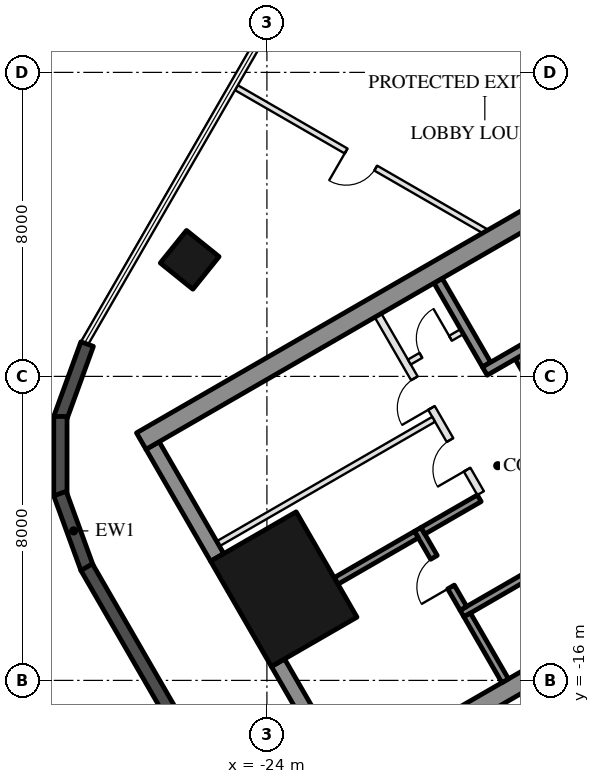
"""IFC4 building model, lengths in metres.
Left out: names, types, materials, properties, quantities, classifications, styles, units other than length and angle.
Written with IfcOpenShell. Run it as: python <this file> out.ifc"""

import sys

from ifc_helpers import new_model, si_unit, direction, frame, frame_2d, origin, origin_2d, place, context, subcontext, project, spatial, rectangle, hollow_rectangle, extrude, boolean, halfspace, element, fill, save


model = new_model("IFC4")
c1 = context("Model", 3, precision=1e-05, world=origin(), true_north=direction((0.0, 1.0)))
c2 = subcontext(c1, "Body", "Model", "MODEL_VIEW")
j1 = project(units=[si_unit("LENGTHUNIT", "METRE"), si_unit("PLANEANGLEUNIT", "RADIAN")], contexts=[c1])
p1 = place(None, origin())
s1 = spatial("IfcSite", under=j1, at=p1, CompositionType="ELEMENT")
p2 = place(p1, origin())
s2 = spatial("IfcBuilding", under=s1, at=p2, CompositionType="ELEMENT")
p3 = place(p2, frame((0.0, 0.0, 9.0)))
s3 = spatial("IfcBuildingStorey", under=s2, at=p3, CompositionType="ELEMENT", Elevation=9.0)
p4 = place(p3, frame((-26.032, -4.932, 0.0), z_axis=(0.144210024077, 0.022406246977, 0.989293398872), x_axis=(-0.493357756794, -0.864999630049, 0.091508271899)))
e1 = element("IfcColumn", 1, at=p4, inside=s3, PredefinedType="COLUMN", context=c2, shape_type="SweptSolid", body=[
    boolean("DIFFERENCE", boolean("DIFFERENCE", extrude(hollow_rectangle(XDim=1.1, YDim=1.1, WallThickness=0.05, at=origin_2d()), origin(), (0.0, 0.0, 1.0), 6.57), halfspace(frame((0.0, 0.0, 0.019), z_axis=(0.0, 0.0, 1.0), x_axis=(1.0, 0.0, 0.0)), True)), halfspace(frame((0.0, 0.0, 6.552), z_axis=(0.0, 0.0, 1.0), x_axis=(1.0, 0.0, 0.0)), False)),
])
p5 = place(p3, frame((-23.556, -13.6, 0.0), z_axis=(0.0, 0.0, 1.0), x_axis=(-0.5, 0.866025403784, 0.0)))
e2 = element("IfcColumn", 2, at=p5, inside=s3, PredefinedType="COLUMN", context=c2, shape_type="SweptSolid", body=[
    extrude(hollow_rectangle(XDim=3.2, YDim=2.6, WallThickness=0.08, at=origin_2d()), origin(), (0.0, 0.0, 1.0), 6.5),
])
p6 = place(p3, frame((-28.73, -7.15, 0.0), z_axis=(0.0, 0.0, 1.0), x_axis=(-0.342005648315, -0.939697896412, 0.0)))
e3 = element("IfcWall", 3, at=p6, inside=s3, PredefinedType="SOLIDWALL", context=c2, shape_type="SweptSolid", body=[
    extrude(rectangle(XDim=2.09, YDim=0.35, at=frame_2d((1.045, 0.0))), origin(), (0.0, 0.0, 1.0), 6.15),
])
for number, where, z_axis, x_axis in (
    (4, (-29.434, -9.054, 0.0), (0.0, 0.0, 1.0), (0.0, -1.0, 0.0)),
    (5, (-29.445, -11.084, 0.0), (0.0, 0.0, 1.0), (0.342, -0.94, 0.0)),
):
    element("IfcWall", number, at=place(p3, frame(where, z_axis=z_axis, x_axis=x_axis)), inside=s3, PredefinedType="SOLIDWALL", context=c2, shape_type="SweptSolid", body=[
        extrude(rectangle(XDim=2.09, YDim=0.35, at=frame_2d((1.045, 0.0))), origin(), (0.0, 0.0, 1.0), 6.15),
    ])
p7 = place(p3, frame((-28.743, -13.021, 0.0), z_axis=(0.0, 0.0, 1.0), x_axis=(0.499981900942, -0.866035853028, 0.0)))
e6 = element("IfcWall", 6, at=p7, inside=s3, PredefinedType="SOLIDWALL", context=c2, shape_type="SweptSolid", body=[
    extrude(rectangle(XDim=6.191, YDim=0.35, at=frame_2d((3.095, 0.0))), origin(), (0.0, 0.0, 1.0), 6.15),
])
p8 = place(p3, frame((-8.547, -10.997, 0.0), z_axis=(0.0, 0.0, 1.0), x_axis=(-0.866024264262, -0.500001973705, 0.0)))
e7 = element("IfcWall", 7, at=p8, inside=s3, PredefinedType="SHEAR", context=c2, shape_type="SweptSolid", body=[
    extrude(rectangle(XDim=15.6, YDim=0.5, at=frame_2d((7.8, 0.0))), origin(), (0.0, 0.0, 1.0), 6.15),
])
p9 = place(p3, frame((-23.708, -15.536, 0.0), z_axis=(0.0, 0.0, 1.0), x_axis=(0.500008388397, -0.866020560687, 0.0)))
e8 = element("IfcWall", 8, at=p9, inside=s3, PredefinedType="SHEAR", context=c2, shape_type="SweptSolid", body=[
    extrude(rectangle(XDim=3.4, YDim=0.4, at=frame_2d((1.7, 0.0))), origin(), (0.0, 0.0, 1.0), 6.15),
])
p10 = place(p3, frame((-27.009, -9.82, 0.0), z_axis=(0.0, 0.0, 1.0), x_axis=(0.499977295307, -0.866038511948, 0.0)))
e9 = element("IfcWall", 9, at=p10, inside=s3, PredefinedType="SHEAR", context=c2, shape_type="SweptSolid", body=[
    extrude(rectangle(XDim=3.4, YDim=0.4, at=frame_2d((1.7, 0.0))), origin(), (0.0, 0.0, 1.0), 6.15),
])
p11 = place(p3, frame((-19.496, -5.482, 0.0), z_axis=(0.0, 0.0, 1.0), x_axis=(0.499990435942, -0.866030925526, 0.0)))
e10 = element("IfcWall", 10, at=p11, inside=s3, PredefinedType="SHEAR", context=c2, shape_type="SweptSolid", body=[
    extrude(rectangle(XDim=2.55, YDim=0.25, at=frame_2d((1.275, 0.0))), origin(), (0.0, 0.0, 1.0), 6.15),
])
p12 = place(p3, frame((-17.381, -7.495, 0.0), z_axis=(0.0, 0.0, 1.0), x_axis=(0.500011755427, -0.866018616679, 0.0)))
e11 = element("IfcWall", 11, at=p12, inside=s3, PredefinedType="SHEAR", context=c2, shape_type="SweptSolid", body=[
    extrude(rectangle(XDim=2.8, YDim=0.2, at=frame_2d((1.4, 0.0))), origin(), (0.0, 0.0, 1.0), 6.15),
])
p13 = place(p3, frame((-10.068, -9.162, 0.0), z_axis=(0.0, 0.0, 1.0), x_axis=(-0.866032725843, -0.499987317609, 0.0)))
e12 = element("IfcWall", 12, at=p13, inside=s3, PredefinedType="SHEAR", context=c2, shape_type="SweptSolid", body=[
    extrude(rectangle(XDim=10.16, YDim=0.2, at=frame_2d((5.08, 0.0))), origin(), (0.0, 0.0, 1.0), 6.15),
])
p14 = place(p13, frame((0.72, 0.0, 0.0)))
e13 = element("IfcOpeningElement", 13, at=p14, cuts=e12, PredefinedType="OPENING", context=c2, shape_type="SweptSolid", body=[
    extrude(rectangle(XDim=0.9, YDim=2.1, at=frame_2d((0.45, 1.05))), frame((0.0, 0.11, 0.0), z_axis=(0.0, -1.0, 0.0), x_axis=(1.0, 0.0, 0.0)), (0.0, 0.0, 1.0), 0.22),
])
p15 = place(p13, frame((5.8, 0.0, 0.0)))
e14 = element("IfcOpeningElement", 14, at=p15, cuts=e12, PredefinedType="OPENING", context=c2, shape_type="SweptSolid", body=[
    extrude(rectangle(XDim=0.9, YDim=2.1, at=frame_2d((0.45, 1.05))), frame((0.0, 0.11, 0.0), z_axis=(0.0, -1.0, 0.0), x_axis=(1.0, 0.0, 0.0)), (0.0, 0.0, 1.0), 0.22),
])
p16 = place(p3, frame((-20.031, -12.026, 0.0), z_axis=(0.0, 0.0, 1.0), x_axis=(0.500033551112, -0.866006032174, 0.0)))
e15 = element("IfcWall", 15, at=p16, inside=s3, PredefinedType="SHEAR", context=c2, shape_type="SweptSolid", body=[
    extrude(rectangle(XDim=2.4, YDim=0.2, at=frame_2d((1.2, 0.0))), origin(), (0.0, 0.0, 1.0), 6.15),
])
p17 = place(p16, frame((0.85, 0.0, 0.0)))
e16 = element("IfcOpeningElement", 16, at=p17, cuts=e15, PredefinedType="OPENING", context=c2, shape_type="SweptSolid", body=[
    extrude(rectangle(XDim=0.9, YDim=2.1, at=frame_2d((0.45, 1.05))), frame((0.0, 0.11, 0.0), z_axis=(0.0, -1.0, 0.0), x_axis=(1.0, 0.0, 0.0)), (0.0, 0.0, 1.0), 0.22),
])
p18 = place(p3, frame((-18.413, -11.208, 0.0), z_axis=(0.0, 0.0, 1.0), x_axis=(-0.866038183914, -0.499977863513, 0.0)))
e17 = element("IfcWall", 17, at=p18, inside=s3, PredefinedType="SHEAR", context=c2, shape_type="SweptSolid", body=[
    extrude(rectangle(XDim=1.71, YDim=0.2, at=frame_2d((0.855, 0.0))), origin(), (0.0, 0.0, 1.0), 6.15),
])
p19 = place(p3, frame((-18.73, -14.278, 0.0), z_axis=(0.0, 0.0, 1.0), x_axis=(0.50002537861, -0.866010750942, 0.0)))
e18 = element("IfcWall", 18, at=p19, inside=s3, PredefinedType="SHEAR", context=c2, shape_type="SweptSolid", body=[
    extrude(rectangle(XDim=2.0, YDim=0.2, at=frame_2d((1.0, 0.0))), origin(), (0.0, 0.0, 1.0), 6.15),
])
p20 = place(p3, frame((-20.067, -12.163, 0.0), z_axis=(0.0, 0.0, 1.0), x_axis=(-0.866048967903, -0.499959183527, 0.0)))
e19 = element("IfcWall", 19, at=p20, inside=s3, PredefinedType="SHEAR", context=c2, shape_type="SweptSolid", body=[
    extrude(rectangle(XDim=2.44, YDim=0.2, at=frame_2d((1.22, 0.0))), origin(), (0.0, 0.0, 1.0), 6.15),
])
p21 = place(p3, frame((-21.076, -6.395, 0.0), z_axis=(0.0, 0.0, 1.0), x_axis=(0.50001468107, -0.866016927499, 0.0)))
e20 = element("IfcWall", 20, at=p21, inside=s3, PredefinedType="PARTITIONING", context=c2, shape_type="SweptSolid", body=[
    extrude(rectangle(XDim=5.4, YDim=0.2, at=frame_2d((2.7, 0.0))), origin(), (0.0, 0.0, 1.0), 6.15),
])
p22 = place(p21, frame((1.913, 0.0, 0.0)))
e21 = element("IfcOpeningElement", 21, at=p22, cuts=e20, PredefinedType="OPENING", context=c2, shape_type="SweptSolid", body=[
    extrude(rectangle(XDim=0.9, YDim=2.1, at=frame_2d((0.45, 1.05))), frame((0.0, 0.11, 0.0), z_axis=(0.0, -1.0, 0.0), x_axis=(1.0, 0.0, 0.0)), (0.0, 0.0, 1.0), 0.22),
])
p23 = place(p21, frame((3.788, 0.0, 0.0)))
e22 = element("IfcOpeningElement", 22, at=p23, cuts=e20, PredefinedType="OPENING", context=c2, shape_type="SweptSolid", body=[
    extrude(rectangle(XDim=0.9, YDim=2.1, at=frame_2d((0.45, 1.05))), frame((0.0, 0.11, 0.0), z_axis=(0.0, -1.0, 0.0), x_axis=(1.0, 0.0, 0.0)), (0.0, 0.0, 1.0), 0.22),
])
p24 = place(p3, frame((-18.866, -6.822, 0.0), z_axis=(0.0, 0.0, 1.0), x_axis=(-0.866028054938, -0.499995408039, 0.0)))
e23 = element("IfcWall", 23, at=p24, inside=s3, PredefinedType="PARTITIONING", context=c2, shape_type="SweptSolid", body=[
    extrude(rectangle(XDim=1.6, YDim=0.15, at=frame_2d((0.8, 0.0))), origin(), (0.0, 0.0, 1.0), 6.15),
])
p25 = place(p24, frame((0.35, 0.0, 0.0)))
e24 = element("IfcOpeningElement", 24, at=p25, cuts=e23, PredefinedType="OPENING", context=c2, shape_type="SweptSolid", body=[
    extrude(rectangle(XDim=0.9, YDim=2.1, at=frame_2d((0.45, 1.05))), frame((0.0, 0.085, 0.0), z_axis=(0.0, -1.0, 0.0), x_axis=(1.0, 0.0, 0.0)), (0.0, 0.0, 1.0), 0.17),
])
p26 = place(p3, frame((-19.613, -9.13, 0.0), z_axis=(0.0, 0.0, 1.0), x_axis=(-0.866037242061, -0.499979494943, 0.0)))
e25 = element("IfcWall", 25, at=p26, inside=s3, PredefinedType="PARTITIONING", context=c2, shape_type="SweptSolid", body=[
    extrude(rectangle(XDim=6.55, YDim=0.15, at=frame_2d((3.275, 0.0))), origin(), (0.0, 0.0, 1.0), 6.15),
])
p27 = place(p3, frame((-15.274, -2.756, 0.0), z_axis=(0.0, 0.0, 1.0), x_axis=(-0.86602318214, -0.500003847982, 0.0)))
e26 = element("IfcWall", 26, at=p27, inside=s3, PredefinedType="SHEAR", context=c2, shape_type="SweptSolid", body=[
    extrude(rectangle(XDim=13.894, YDim=0.5, at=frame_2d((6.947, 0.0))), origin(), (0.0, 0.0, 1.0), 6.15),
])
p28 = place(p3, frame((-13.812, -5.29, 0.0), z_axis=(0.0, 0.0, 1.0), x_axis=(-0.866023561601, -0.500003190742, 0.0)))
e27 = element("IfcWall", 27, at=p28, inside=s3, PredefinedType="SHEAR", context=c2, shape_type="SweptSolid", body=[
    extrude(rectangle(XDim=5.144, YDim=0.25, at=frame_2d((2.572, 0.0))), origin(), (0.0, 0.0, 1.0), 6.15),
])
p29 = place(p3, frame((-21.628, 5.097, 0.0), z_axis=(0.0, 0.0, 1.0), x_axis=(0.866023652799, -0.500003032783, 0.0)))
e28 = element("IfcWall", 28, at=p29, inside=s3, PredefinedType="SOLIDWALL", context=c2, shape_type="SweptSolid", body=[
    extrude(rectangle(XDim=12.579, YDim=0.2, at=frame_2d((6.289, 0.0))), origin(), (0.0, 0.0, 1.0), 6.15),
])
p30 = place(p3, frame((-24.802, -0.403, 0.0), z_axis=(0.0, 0.0, 1.0), x_axis=(0.866018471794, -0.500012006368, 0.0)))
e29 = element("IfcWall", 29, at=p30, inside=s3, PredefinedType="PARTITIONING", context=c2, shape_type="SweptSolid", body=[
    extrude(rectangle(XDim=7.566, YDim=0.15, at=frame_2d((3.783, 0.0))), origin(), (0.0, 0.0, 1.0), 5.55),
])
p31 = place(p30, frame((3.333, 0.0, 0.0)))
e30 = element("IfcOpeningElement", 30, at=p31, cuts=e29, PredefinedType="OPENING", context=c2, shape_type="SweptSolid", body=[
    extrude(rectangle(XDim=0.9, YDim=2.1, at=frame_2d((0.45, 1.05))), frame((0.0, 0.085, 0.0), z_axis=(0.0, -1.0, 0.0), x_axis=(1.0, 0.0, 0.0)), (0.0, 0.0, 1.0), 0.17),
])
p32 = place(p25, frame((0.9, 0.0, 0.0), z_axis=(0.0, 0.0, 1.0), x_axis=(-1.0, 0.0, 0.0)))
e31 = element("IfcDoor", 31, at=p32, inside=s3, OperationType="SINGLE_SWING_RIGHT", PredefinedType="DOOR", context=c2, shape_type="SweptSolid", body=[
    extrude(rectangle(XDim=0.9, YDim=2.1, at=frame_2d((0.45, 1.05))), frame((0.0, 0.025, 0.0), z_axis=(0.0, -1.0, 0.0), x_axis=(1.0, 0.0, 0.0)), (0.0, 0.0, 1.0), 0.05),
])
fill(e24, e31)
p33 = place(p17, frame((0.9, 0.0, 0.0), z_axis=(0.0, 0.0, 1.0), x_axis=(-1.0, 0.0, 0.0)))
e32 = element("IfcDoor", 32, at=p33, inside=s3, OperationType="SINGLE_SWING_LEFT", PredefinedType="DOOR", context=c2, shape_type="SweptSolid", body=[
    extrude(rectangle(XDim=0.9, YDim=2.1, at=frame_2d((0.45, 1.05))), frame((0.0, 0.025, 0.0), z_axis=(0.0, -1.0, 0.0), x_axis=(1.0, 0.0, 0.0)), (0.0, 0.0, 1.0), 0.05),
])
fill(e16, e32)
p34 = place(p22, frame((0.9, 0.0, 0.0), z_axis=(0.0, 0.0, 1.0), x_axis=(-1.0, 0.0, 0.0)))
e33 = element("IfcDoor", 33, at=p34, inside=s3, OperationType="SINGLE_SWING_LEFT", PredefinedType="DOOR", context=c2, shape_type="SweptSolid", body=[
    extrude(rectangle(XDim=0.9, YDim=2.1, at=frame_2d((0.45, 1.05))), frame((0.0, 0.025, 0.0), z_axis=(0.0, -1.0, 0.0), x_axis=(1.0, 0.0, 0.0)), (0.0, 0.0, 1.0), 0.05),
])
fill(e21, e33)
p35 = place(p23, frame((0.9, 0.0, 0.0), z_axis=(0.0, 0.0, 1.0), x_axis=(-1.0, 0.0, 0.0)))
e34 = element("IfcDoor", 34, at=p35, inside=s3, OperationType="SINGLE_SWING_LEFT", PredefinedType="DOOR", context=c2, shape_type="SweptSolid", body=[
    extrude(rectangle(XDim=0.9, YDim=2.1, at=frame_2d((0.45, 1.05))), frame((0.0, 0.025, 0.0), z_axis=(0.0, -1.0, 0.0), x_axis=(1.0, 0.0, 0.0)), (0.0, 0.0, 1.0), 0.05),
])
fill(e22, e34)
p36 = place(p31, frame((0.9, 0.0, 0.0), z_axis=(0.0, 0.0, 1.0), x_axis=(-1.0, 0.0, 0.0)))
e35 = element("IfcDoor", 35, at=p36, inside=s3, OperationType="SINGLE_SWING_RIGHT", PredefinedType="DOOR", context=c2, shape_type="SweptSolid", body=[
    extrude(rectangle(XDim=0.9, YDim=2.1, at=frame_2d((0.45, 1.05))), frame((0.0, 0.025, 0.0), z_axis=(0.0, -1.0, 0.0), x_axis=(1.0, 0.0, 0.0)), (0.0, 0.0, 1.0), 0.05),
])
fill(e30, e35)
save(model, sys.argv[1])
